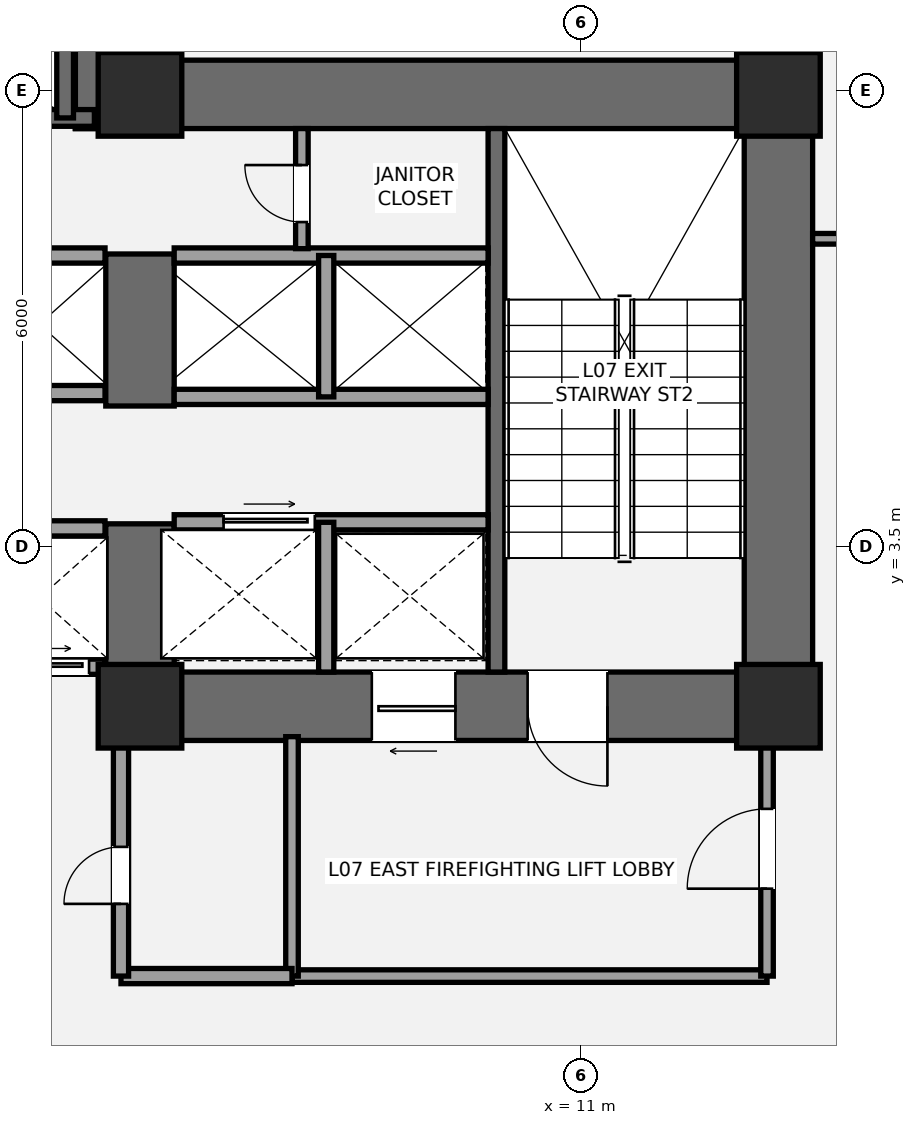
"""IFC4 building model, lengths in metres.
Left out: names, types, materials, properties, quantities, classifications, styles, units other than length and angle.
Written with IfcOpenShell. Run it as: python <this file> out.ifc"""

import sys

from ifc_helpers import new_model, si_unit, direction, frame, frame_2d, origin, origin_2d, place, context, subcontext, project, spatial, rectangle, extrude, element, fill, save


model = new_model("IFC4")
c1 = context("Model", 3, precision=1e-05, world=origin(), true_north=direction((0.0, 1.0)))
c2 = subcontext(c1, "Body", "Model", "MODEL_VIEW")
j1 = project(units=[si_unit("LENGTHUNIT", "METRE"), si_unit("PLANEANGLEUNIT", "RADIAN")], contexts=[c1])
p1 = place(None, origin())
s1 = spatial("IfcSite", under=j1, at=p1, CompositionType="ELEMENT")
p2 = place(p1, origin())
s2 = spatial("IfcBuilding", under=s1, at=p2, CompositionType="ELEMENT")
p3 = place(p2, frame((0.0, 0.0, 30.6)))
s3 = spatial("IfcBuildingStorey", under=s2, at=p3, CompositionType="ELEMENT", Elevation=30.6)
p4 = place(p3, frame((13.6, 0.95, 0.0), z_axis=(0.0, 0.0, 1.0), x_axis=(0.0, 1.0, 0.0)))
e1 = element("IfcWall", 1, at=p4, inside=s3, PredefinedType="SHEAR", context=c2, shape_type="SweptSolid", body=[
    extrude(rectangle(XDim=8.95, YDim=0.9, at=frame_2d((4.475, 0.0))), origin(), (0.0, 0.0, 1.0), 3.6),
])
p5 = place(p3, frame((4.35, 9.45, 0.0), z_axis=(0.0, 0.0, 1.0), x_axis=(1.0, 0.0, 0.0)))
e2 = element("IfcWall", 2, at=p5, inside=s3, PredefinedType="SHEAR", context=c2, shape_type="SweptSolid", body=[
    extrude(rectangle(XDim=9.7, YDim=0.9, at=frame_2d((4.85, 0.0))), origin(), (0.0, 0.0, 1.0), 3.6),
])
p6 = place(p3, frame((14.05, 1.4, 0.0), z_axis=(0.0, 0.0, 1.0), x_axis=(-1.0, 0.0, 0.0)))
e3 = element("IfcWall", 3, at=p6, inside=s3, PredefinedType="SHEAR", context=c2, shape_type="SweptSolid", body=[
    extrude(rectangle(XDim=9.3, YDim=0.9, at=frame_2d((4.65, 0.0))), origin(), (0.0, 0.0, 1.0), 3.6),
])
p7 = place(p6, frame((2.7, 0.0, 0.0)))
e4 = element("IfcOpeningElement", 4, at=p7, cuts=e3, PredefinedType="OPENING", context=c2, shape_type="SweptSolid", body=[
    extrude(rectangle(XDim=1.05, YDim=2.15, at=frame_2d((0.525, 1.075))), frame((0.0, 0.46, 0.0), z_axis=(0.0, -1.0, 0.0), x_axis=(1.0, 0.0, 0.0)), (0.0, 0.0, 1.0), 0.92),
])
p8 = place(p6, frame((4.7, 0.0, 0.0)))
e5 = element("IfcOpeningElement", 5, at=p8, cuts=e3, PredefinedType="OPENING", context=c2, shape_type="SweptSolid", body=[
    extrude(rectangle(XDim=1.1, YDim=2.2, at=frame_2d((0.55, 1.1))), frame((0.0, 0.46, 0.0), z_axis=(0.0, -1.0, 0.0), x_axis=(1.0, 0.0, 0.0)), (0.0, 0.0, 1.0), 0.92),
])
p9 = place(p3, frame((5.2, 0.95, 0.0), z_axis=(0.0, 0.0, 1.0), x_axis=(0.0, 1.0, 0.0)))
e6 = element("IfcWall", 6, at=p9, inside=s3, PredefinedType="SHEAR", context=c2, shape_type="SweptSolid", body=[
    extrude(rectangle(XDim=2.85, YDim=0.9, at=frame_2d((1.425, 0.0))), origin(), (0.0, 0.0, 1.0), 3.6),
])
p10 = place(p3, frame((5.2, 5.35, 0.0), z_axis=(0.0, 0.0, 1.0), x_axis=(0.0, 1.0, 0.0)))
e7 = element("IfcWall", 7, at=p10, inside=s3, PredefinedType="SHEAR", context=c2, shape_type="SweptSolid", body=[
    extrude(rectangle(XDim=2.0, YDim=0.9, at=frame_2d((1.0, 0.0))), origin(), (0.0, 0.0, 1.0), 3.6),
])
p11 = place(p3, frame((9.89, 1.85, 0.0), z_axis=(0.0, 0.0, 1.0), x_axis=(0.0, 1.0, 0.0)))
e8 = element("IfcWall", 8, at=p11, inside=s3, PredefinedType="SHEAR", context=c2, shape_type="SweptSolid", body=[
    extrude(rectangle(XDim=7.15, YDim=0.22, at=frame_2d((3.575, 0.0))), origin(), (0.0, 0.0, 1.0), 3.6),
])
p12 = place(p3, frame((4.8, 9.0, 0.0), z_axis=(0.0, 0.0, 1.0), x_axis=(0.0, 1.0, 0.0)))
e9 = element("IfcWall", 9, at=p12, inside=s3, PredefinedType="SHEAR", context=c2, shape_type="SweptSolid", body=[
    extrude(rectangle(XDim=4.3, YDim=0.9, at=frame_2d((2.15, 0.0))), origin(), (0.0, 0.0, 1.0), 3.6),
])
p13 = place(p3, frame((-4.7, 9.14, 0.0), z_axis=(0.0, 0.0, 1.0), x_axis=(1.0, 0.0, 0.0)))
e10 = element("IfcWall", 10, at=p13, inside=s3, PredefinedType="SHEAR", context=c2, shape_type="SweptSolid", body=[
    extrude(rectangle(XDim=9.3, YDim=0.22, at=frame_2d((4.65, 0.0))), origin(), (0.0, 0.0, 1.0), 3.6),
])
p14 = place(p13, frame((1.15, 0.0, 0.0)))
e11 = element("IfcOpeningElement", 11, at=p14, cuts=e10, PredefinedType="OPENING", context=c2, shape_type="SweptSolid", body=[
    extrude(rectangle(XDim=1.05, YDim=2.15, at=frame_2d((0.525, 1.075))), frame((0.0, 0.12, 0.0), z_axis=(0.0, -1.0, 0.0), x_axis=(1.0, 0.0, 0.0)), (0.0, 0.0, 1.0), 0.24),
])
p15 = place(p3, frame((4.215, 9.14, 0.0), z_axis=(0.0, 0.0, 1.0), x_axis=(0.0, 1.0, 0.0)))
e12 = element("IfcWall", 12, at=p15, inside=s3, PredefinedType="SHEAR", context=c2, shape_type="SweptSolid", body=[
    extrude(rectangle(XDim=3.26, YDim=0.22, at=frame_2d((1.63, 0.0))), origin(), (0.0, 0.0, 1.0), 3.6),
])
for number, where, z_axis, x_axis in (
    (13, (5.2, 1.4, 0.0), (0.0, 0.0, 1.0), (1.0, 0.0, 0.0)),
    (14, (5.2, 9.45, 0.0), (0.0, 0.0, 1.0), (1.0, 0.0, 0.0)),
    (15, (13.6, 1.4, 0.0), (0.0, 0.0, 1.0), (1.0, 0.0, 0.0)),
    (16, (13.6, 9.45, 0.0), (0.0, 0.0, 1.0), (1.0, 0.0, 0.0)),
):
    element("IfcColumn", number, at=place(p3, frame(where, z_axis=z_axis, x_axis=x_axis)), inside=s3, PredefinedType="COLUMN", context=c2, shape_type="SweptSolid", body=[
        extrude(rectangle(XDim=1.1, YDim=1.1, at=origin_2d()), origin(), (0.0, 0.0, 1.0), 3.6),
    ])
p16 = place(p3, frame((7.2, -2.15, 0.0), z_axis=(0.0, 0.0, 1.0), x_axis=(1.0, 0.0, 0.0)))
e17 = element("IfcWall", 17, at=p16, inside=s3, PredefinedType="PARTITIONING", context=c2, shape_type="SweptSolid", body=[
    extrude(rectangle(XDim=6.25, YDim=0.165, at=frame_2d((3.125, 0.0))), origin(), (0.0, 0.0, 1.0), 2.853),
])
p17 = place(p3, frame((7.2, -2.15, 0.0), z_axis=(0.0, 0.0, 1.0), x_axis=(0.0, 1.0, 0.0)))
e18 = element("IfcWall", 18, at=p17, inside=s3, PredefinedType="PARTITIONING", context=c2, shape_type="SweptSolid", body=[
    extrude(rectangle(XDim=3.15, YDim=0.165, at=frame_2d((1.575, 0.0))), origin(), (0.0, 0.0, 1.0), 2.853),
])
p18 = place(p3, frame((13.45, -2.15, 0.0), z_axis=(0.0, 0.0, 1.0), x_axis=(0.0, 1.0, 0.0)))
e19 = element("IfcWall", 19, at=p18, inside=s3, PredefinedType="PARTITIONING", context=c2, shape_type="SweptSolid", body=[
    extrude(rectangle(XDim=3.15, YDim=0.165, at=frame_2d((1.575, 0.0))), origin(), (0.0, 0.0, 1.0), 2.853),
])
p19 = place(p18, frame((1.15, 0.0, 0.0)))
e20 = element("IfcOpeningElement", 20, at=p19, cuts=e19, PredefinedType="OPENING", context=c2, shape_type="SweptSolid", body=[
    extrude(rectangle(XDim=1.05, YDim=2.15, at=frame_2d((0.525, 1.075))), frame((0.0, 0.093, 0.0), z_axis=(0.0, -1.0, 0.0), x_axis=(1.0, 0.0, 0.0)), (0.0, 0.0, 1.0), 0.185),
])
p20 = place(p3, frame((4.95, -2.15, 0.0), z_axis=(0.0, 0.0, 1.0), x_axis=(1.0, 0.0, 0.0)))
e21 = element("IfcWall", 21, at=p20, inside=s3, PredefinedType="SOLIDWALL", context=c2, shape_type="SweptSolid", body=[
    extrude(rectangle(XDim=2.25, YDim=0.2, at=frame_2d((1.125, 0.0))), origin(), (0.0, 0.0, 1.0), 3.4),
])
p21 = place(p3, frame((4.95, -2.15, 0.0), z_axis=(0.0, 0.0, 1.0), x_axis=(0.0, 1.0, 0.0)))
e22 = element("IfcWall", 22, at=p21, inside=s3, PredefinedType="SOLIDWALL", context=c2, shape_type="SweptSolid", body=[
    extrude(rectangle(XDim=3.15, YDim=0.2, at=frame_2d((1.575, 0.0))), origin(), (0.0, 0.0, 1.0), 2.853),
])
p22 = place(p21, frame((0.95, 0.0, 0.0)))
e23 = element("IfcOpeningElement", 23, at=p22, cuts=e22, PredefinedType="OPENING", context=c2, shape_type="SweptSolid", body=[
    extrude(rectangle(XDim=0.75, YDim=2.1, at=frame_2d((0.375, 1.05))), frame((0.0, 0.11, 0.0), z_axis=(0.0, -1.0, 0.0), x_axis=(1.0, 0.0, 0.0)), (0.0, 0.0, 1.0), 0.22),
])
p23 = place(p3, frame((5.65, 3.82, 0.0), z_axis=(0.0, 0.0, 1.0), x_axis=(1.0, 0.0, 0.0)))
e24 = element("IfcWall", 24, at=p23, inside=s3, PredefinedType="SOLIDWALL", context=c2, shape_type="SweptSolid", body=[
    extrude(rectangle(XDim=4.13, YDim=0.2, at=frame_2d((2.065, 0.0))), origin(), (0.0, 0.0, 1.0), 3.4),
])
p24 = place(p23, frame((0.65, 0.0, 0.0)))
e25 = element("IfcOpeningElement", 25, at=p24, cuts=e24, PredefinedType="OPENING", context=c2, shape_type="SweptSolid", body=[
    extrude(rectangle(XDim=1.2, YDim=2.2, at=frame_2d((0.6, 1.1))), frame((0.0, 0.11, 0.0), z_axis=(0.0, -1.0, 0.0), x_axis=(1.0, 0.0, 0.0)), (0.0, 0.0, 1.0), 0.22),
])
p25 = place(p3, frame((7.65, 1.85, 0.0), z_axis=(0.0, 0.0, 1.0), x_axis=(0.0, 1.0, 0.0)))
e26 = element("IfcWall", 26, at=p25, inside=s3, PredefinedType="SOLIDWALL", context=c2, shape_type="SweptSolid", body=[
    extrude(rectangle(XDim=1.97, YDim=0.2, at=frame_2d((0.985, 0.0))), origin(), (0.0, 0.0, 1.0), 3.4),
])
for number, where, z_axis, x_axis in (
    (27, (5.65, 5.47, 0.0), (0.0, 0.0, 1.0), (1.0, 0.0, 0.0)),
    (28, (5.65, 7.33, 0.0), (0.0, 0.0, 1.0), (1.0, 0.0, 0.0)),
):
    element("IfcWall", number, at=place(p3, frame(where, z_axis=z_axis, x_axis=x_axis)), inside=s3, PredefinedType="SOLIDWALL", context=c2, shape_type="SweptSolid", body=[
        extrude(rectangle(XDim=4.13, YDim=0.2, at=frame_2d((2.065, 0.0))), origin(), (0.0, 0.0, 1.0), 3.4),
    ])
p26 = place(p3, frame((7.65, 5.47, 0.0), z_axis=(0.0, 0.0, 1.0), x_axis=(0.0, 1.0, 0.0)))
e29 = element("IfcWall", 29, at=p26, inside=s3, PredefinedType="SOLIDWALL", context=c2, shape_type="SweptSolid", body=[
    extrude(rectangle(XDim=1.86, YDim=0.2, at=frame_2d((0.93, 0.0))), origin(), (0.0, 0.0, 1.0), 3.4),
])
p27 = place(p3, frame((0.88, 1.92, 0.0), z_axis=(0.0, 0.0, 1.0), x_axis=(1.0, 0.0, 0.0)))
e30 = element("IfcWall", 30, at=p27, inside=s3, PredefinedType="SOLIDWALL", context=c2, shape_type="SweptSolid", body=[
    extrude(rectangle(XDim=3.86, YDim=0.2, at=frame_2d((1.93, 0.0))), origin(), (0.0, 0.0, 1.0), 2.39),
])
p28 = place(p27, frame((0.55, 0.0, 0.0)))
e31 = element("IfcOpeningElement", 31, at=p28, cuts=e30, PredefinedType="OPENING", context=c2, shape_type="SweptSolid", body=[
    extrude(rectangle(XDim=1.1, YDim=2.2, at=frame_2d((0.55, 1.1))), frame((0.0, 0.11, 0.0), z_axis=(0.0, -1.0, 0.0), x_axis=(1.0, 0.0, 0.0)), (0.0, 0.0, 1.0), 0.22),
])
p29 = place(p27, frame((2.55, 0.0, 0.0)))
e32 = element("IfcOpeningElement", 32, at=p29, cuts=e30, PredefinedType="OPENING", context=c2, shape_type="SweptSolid", body=[
    extrude(rectangle(XDim=1.1, YDim=2.2, at=frame_2d((0.55, 1.1))), frame((0.0, 0.11, 0.0), z_axis=(0.0, -1.0, 0.0), x_axis=(1.0, 0.0, 0.0)), (0.0, 0.0, 1.0), 0.22),
])
for number, where, z_axis, x_axis in (
    (33, (0.88, 3.74, 0.0), (0.0, 0.0, 1.0), (1.0, 0.0, 0.0)),
    (34, (0.88, 5.52, 0.0), (0.0, 0.0, 1.0), (1.0, 0.0, 0.0)),
    (35, (0.88, 7.33, 0.0), (0.0, 0.0, 1.0), (1.0, 0.0, 0.0)),
):
    element("IfcWall", number, at=place(p3, frame(where, z_axis=z_axis, x_axis=x_axis)), inside=s3, PredefinedType="SOLIDWALL", context=c2, shape_type="SweptSolid", body=[
        extrude(rectangle(XDim=3.86, YDim=0.2, at=frame_2d((1.93, 0.0))), origin(), (0.0, 0.0, 1.0), 3.4),
    ])
p30 = place(p3, frame((7.33, 7.42, 0.0), z_axis=(0.0, 0.0, 1.0), x_axis=(0.0, 1.0, 0.0)))
e36 = element("IfcWall", 36, at=p30, inside=s3, PredefinedType="PARTITIONING", context=c2, shape_type="SweptSolid", body=[
    extrude(rectangle(XDim=1.58, YDim=0.165, at=frame_2d((0.79, 0.0))), origin(), (0.0, 0.0, 1.0), 3.4),
])
p31 = place(p30, frame((0.35, 0.0, 0.0)))
e37 = element("IfcOpeningElement", 37, at=p31, cuts=e36, PredefinedType="OPENING", context=c2, shape_type="SweptSolid", body=[
    extrude(rectangle(XDim=0.75, YDim=2.1, at=frame_2d((0.375, 1.05))), frame((0.0, 0.093, 0.0), z_axis=(0.0, -1.0, 0.0), x_axis=(1.0, 0.0, 0.0)), (0.0, 0.0, 1.0), 0.185),
])
p32 = place(p3, frame((14.05, 7.55, 0.0), z_axis=(0.0, 0.0, 1.0), x_axis=(1.0, 0.0, 0.0)))
e38 = element("IfcWall", 38, at=p32, inside=s3, PredefinedType="PARTITIONING", context=c2, shape_type="SweptSolid", body=[
    extrude(rectangle(XDim=9.413, YDim=0.14, at=frame_2d((4.707, 0.0))), origin(), (0.0, 0.0, 1.0), 3.4),
])
p33 = place(p32, frame((1.2, 0.0, 0.0)))
e39 = element("IfcOpeningElement", 39, at=p33, cuts=e38, PredefinedType="OPENING", context=c2, shape_type="SweptSolid", body=[
    extrude(rectangle(XDim=0.92, YDim=2.15, at=frame_2d((0.46, 1.075))), frame((0.0, 0.08, 0.0), z_axis=(0.0, -1.0, 0.0), x_axis=(1.0, 0.0, 0.0)), (0.0, 0.0, 1.0), 0.16),
])
p34 = place(p7, origin())
e40 = element("IfcDoor", 40, at=p34, inside=s3, OperationType="SINGLE_SWING_LEFT", PredefinedType="DOOR", context=c2, shape_type="SweptSolid", body=[
    extrude(rectangle(XDim=1.05, YDim=2.15, at=frame_2d((0.525, 1.075))), frame((0.0, 0.025, 0.0), z_axis=(0.0, -1.0, 0.0), x_axis=(1.0, 0.0, 0.0)), (0.0, 0.0, 1.0), 0.05),
])
fill(e4, e40)
p35 = place(p19, origin())
e41 = element("IfcDoor", 41, at=p35, inside=s3, OperationType="SINGLE_SWING_LEFT", PredefinedType="DOOR", context=c2, shape_type="SweptSolid", body=[
    extrude(rectangle(XDim=1.05, YDim=2.15, at=frame_2d((0.525, 1.075))), frame((0.0, 0.025, 0.0), z_axis=(0.0, -1.0, 0.0), x_axis=(1.0, 0.0, 0.0)), (0.0, 0.0, 1.0), 0.05),
])
fill(e20, e41)
p36 = place(p22, origin())
e42 = element("IfcDoor", 42, at=p36, inside=s3, OperationType="SINGLE_SWING_LEFT", PredefinedType="DOOR", context=c2, shape_type="SweptSolid", body=[
    extrude(rectangle(XDim=0.75, YDim=2.1, at=frame_2d((0.375, 1.05))), frame((0.0, 0.025, 0.0), z_axis=(0.0, -1.0, 0.0), x_axis=(1.0, 0.0, 0.0)), (0.0, 0.0, 1.0), 0.05),
])
fill(e23, e42)
p37 = place(p8, origin())
e43 = element("IfcDoor", 43, at=p37, inside=s3, OperationType="SLIDING_TO_LEFT", PredefinedType="DOOR", context=c2, shape_type="SweptSolid", body=[
    extrude(rectangle(XDim=1.1, YDim=2.2, at=frame_2d((0.55, 1.1))), frame((0.0, 0.025, 0.0), z_axis=(0.0, -1.0, 0.0), x_axis=(1.0, 0.0, 0.0)), (0.0, 0.0, 1.0), 0.05),
])
fill(e5, e43)
p38 = place(p24, origin())
e44 = element("IfcDoor", 44, at=p38, inside=s3, OperationType="SLIDING_TO_RIGHT", PredefinedType="DOOR", context=c2, shape_type="SweptSolid", body=[
    extrude(rectangle(XDim=1.2, YDim=2.2, at=frame_2d((0.6, 1.1))), frame((0.0, 0.025, 0.0), z_axis=(0.0, -1.0, 0.0), x_axis=(1.0, 0.0, 0.0)), (0.0, 0.0, 1.0), 0.05),
])
fill(e25, e44)
p39 = place(p29, origin())
e45 = element("IfcDoor", 45, at=p39, inside=s3, OperationType="SLIDING_TO_LEFT", PredefinedType="DOOR", context=c2, shape_type="SweptSolid", body=[
    extrude(rectangle(XDim=1.1, YDim=2.2, at=frame_2d((0.55, 1.1))), frame((0.0, 0.025, 0.0), z_axis=(0.0, -1.0, 0.0), x_axis=(1.0, 0.0, 0.0)), (0.0, 0.0, 1.0), 0.05),
])
fill(e32, e45)
p40 = place(p31, origin())
e46 = element("IfcDoor", 46, at=p40, inside=s3, OperationType="SINGLE_SWING_RIGHT", PredefinedType="DOOR", context=c2, shape_type="SweptSolid", body=[
    extrude(rectangle(XDim=0.75, YDim=2.1, at=frame_2d((0.375, 1.05))), frame((0.0, 0.025, 0.0), z_axis=(0.0, -1.0, 0.0), x_axis=(1.0, 0.0, 0.0)), (0.0, 0.0, 1.0), 0.05),
])
fill(e37, e46)
save(model, sys.argv[1])
